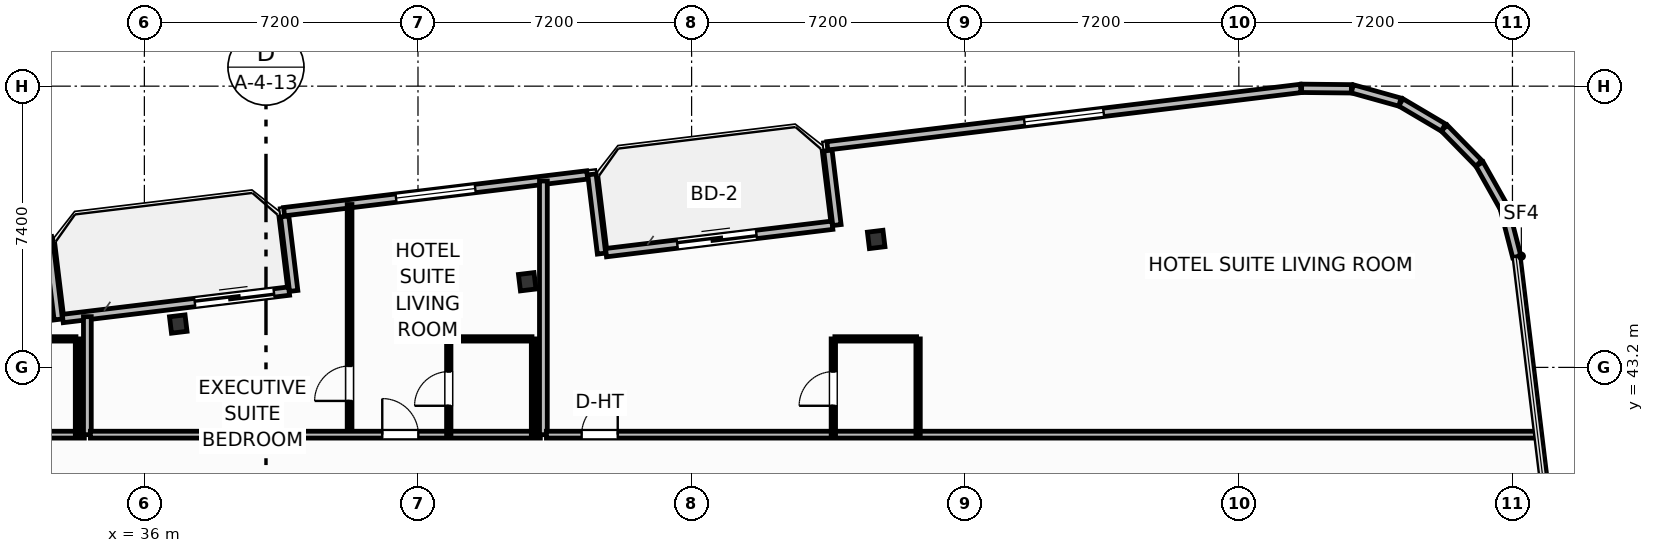
"""IFC4 building model, lengths in metres.
Left out: names, types, materials, properties, quantities, classifications, styles, units other than length and angle.
Written with IfcOpenShell. Run it as: python <this file> out.ifc"""

import sys

from ifc_helpers import new_model, si_unit, direction, frame, frame_2d, origin, origin_2d, place, context, subcontext, project, spatial, rectangle, i_section, extrude, element, fill, save


model = new_model("IFC4")
c1 = context("Model", 3, precision=1e-05, world=origin(), true_north=direction((0.0, 1.0)))
c2 = subcontext(c1, "Body", "Model", "MODEL_VIEW")
j1 = project(units=[si_unit("LENGTHUNIT", "METRE"), si_unit("PLANEANGLEUNIT", "RADIAN")], contexts=[c1])
p1 = place(None, origin())
s1 = spatial("IfcSite", under=j1, at=p1, CompositionType="ELEMENT")
p2 = place(p1, origin())
s2 = spatial("IfcBuilding", under=s1, at=p2, CompositionType="ELEMENT")
p3 = place(p2, frame((0.0, 0.0, 167.2)))
s3 = spatial("IfcBuildingStorey", under=s2, at=p3, CompositionType="ELEMENT", Elevation=167.2)
for number, where, z_axis, x_axis in (
    (1, (55.257, 46.567, 0.0), (0.0, 0.0, 1.0), (0.993, 0.12, 0.0)),
    (2, (46.075, 45.454, 0.0), (0.0, 0.0, 1.0), (0.993, 0.12, 0.0)),
    (3, (36.892, 44.341, 0.0), (0.0, 0.0, 1.0), (0.993, 0.12, 0.0)),
):
    element("IfcColumn", number, at=place(p3, frame(where, z_axis=z_axis, x_axis=x_axis)), inside=s3, PredefinedType="COLUMN", context=c2, shape_type="SweptSolid", body=[
        extrude(i_section(OverallWidth=0.412, OverallDepth=0.435, WebThickness=0.036, FlangeThickness=0.057, FilletRadius=0.025, at=origin_2d()), origin(), (0.0, 0.0, 1.0), 3.7),
    ])
p4 = place(p3, frame((33.852, 44.486, 0.0), z_axis=(0.0, 0.0, 1.0), x_axis=(0.992729951822, 0.120362962556, 0.0)))
e4 = element("IfcWall", 4, at=p4, inside=s3, PredefinedType="SOLIDWALL", context=c2, shape_type="SweptSolid", body=[
    extrude(rectangle(XDim=6.0, YDim=0.22, at=frame_2d((3.0, 0.0))), origin(), (0.0, 0.0, 1.0), 2.73),
])
p5 = place(p4, frame((3.5, 0.0, 0.0)))
e5 = element("IfcOpeningElement", 5, at=p5, cuts=e4, PredefinedType="OPENING", context=c2, shape_type="SweptSolid", body=[
    extrude(rectangle(XDim=2.1, YDim=2.3, at=frame_2d((1.05, 1.15))), frame((0.0, 0.12, 0.0), z_axis=(0.0, -1.0, 0.0), x_axis=(1.0, 0.0, 0.0)), (0.0, 0.0, 1.0), 0.24),
])
p6 = place(p3, frame((48.148, 46.219, 0.0), z_axis=(0.0, 0.0, 1.0), x_axis=(0.992729951822, 0.120362962556, 0.0)))
e6 = element("IfcWall", 6, at=p6, inside=s3, PredefinedType="SOLIDWALL", context=c2, shape_type="SweptSolid", body=[
    extrude(rectangle(XDim=6.0, YDim=0.22, at=frame_2d((3.0, 0.0))), origin(), (0.0, 0.0, 1.0), 2.73),
])
p7 = place(p6, frame((1.888, 0.0, 0.0)))
e7 = element("IfcOpeningElement", 7, at=p7, cuts=e6, PredefinedType="OPENING", context=c2, shape_type="SweptSolid", body=[
    extrude(rectangle(XDim=2.1, YDim=2.3, at=frame_2d((1.05, 1.15))), frame((0.0, 0.12, 0.0), z_axis=(0.0, -1.0, 0.0), x_axis=(1.0, 0.0, 0.0)), (0.0, 0.0, 1.0), 0.24),
])
p8 = place(p3, frame((72.114, 46.112, 0.0), z_axis=(0.0, 0.0, 1.0), x_axis=(-0.248942347653, 0.968518305219, 0.0)))
e8 = element("IfcWall", 8, at=p8, inside=s3, PredefinedType="SOLIDWALL", context=c2, shape_type="SweptSolid", body=[
    extrude(rectangle(XDim=1.326, YDim=0.22, at=frame_2d((0.663, 0.0))), origin(), (0.0, 0.0, 1.0), 2.73),
])
p9 = place(p3, frame((71.771, 47.418, 0.0), z_axis=(0.0, 0.0, 1.0), x_axis=(-0.491098509465, 0.871104043155, 0.0)))
e9 = element("IfcWall", 9, at=p9, inside=s3, PredefinedType="SOLIDWALL", context=c2, shape_type="SweptSolid", body=[
    extrude(rectangle(XDim=1.301, YDim=0.22, at=frame_2d((0.65, 0.0))), origin(), (0.0, 0.0, 1.0), 2.73),
])
p10 = place(p3, frame((71.115, 48.569, 0.0), z_axis=(0.0, 0.0, 1.0), x_axis=(-0.699844331926, 0.714295394827, 0.0)))
e10 = element("IfcWall", 10, at=p10, inside=s3, PredefinedType="SOLIDWALL", context=c2, shape_type="SweptSolid", body=[
    extrude(rectangle(XDim=1.301, YDim=0.22, at=frame_2d((0.65, 0.0))), origin(), (0.0, 0.0, 1.0), 2.73),
])
p11 = place(p3, frame((70.183, 49.511, 0.0), z_axis=(0.0, 0.0, 1.0), x_axis=(-0.860933999601, 0.508716668029, 0.0)))
e11 = element("IfcWall", 11, at=p11, inside=s3, PredefinedType="SOLIDWALL", context=c2, shape_type="SweptSolid", body=[
    extrude(rectangle(XDim=1.301, YDim=0.22, at=frame_2d((0.65, 0.0))), origin(), (0.0, 0.0, 1.0), 2.73),
])
p12 = place(p3, frame((69.039, 50.18, 0.0), z_axis=(0.0, 0.0, 1.0), x_axis=(-0.963205341366, 0.26876657226, 0.0)))
e12 = element("IfcWall", 12, at=p12, inside=s3, PredefinedType="SOLIDWALL", context=c2, shape_type="SweptSolid", body=[
    extrude(rectangle(XDim=1.301, YDim=0.22, at=frame_2d((0.65, 0.0))), origin(), (0.0, 0.0, 1.0), 2.73),
])
p13 = place(p3, frame((67.761, 50.53, 0.0), z_axis=(0.0, 0.0, 1.0), x_axis=(-0.999947358106, 0.010260653861, 0.0)))
e13 = element("IfcWall", 13, at=p13, inside=s3, PredefinedType="SOLIDWALL", context=c2, shape_type="SweptSolid", body=[
    extrude(rectangle(XDim=1.309, YDim=0.22, at=frame_2d((0.654, 0.0))), origin(), (0.0, 0.0, 1.0), 2.73),
])
p14 = place(p3, frame((66.427, 50.54, 0.0), z_axis=(0.0, 0.0, 1.0), x_axis=(-0.992731739233, -0.120348219431, 0.0)))
e14 = element("IfcWall", 14, at=p14, inside=s3, PredefinedType="SOLIDWALL", context=c2, shape_type="SweptSolid", body=[
    extrude(rectangle(XDim=12.547, YDim=0.22, at=frame_2d((6.273, 0.0))), origin(), (0.0, 0.0, 1.0), 2.73),
])
p15 = place(p14, frame((5.224, 0.0, 0.8)))
e15 = element("IfcOpeningElement", 15, at=p15, cuts=e14, PredefinedType="OPENING", context=c2, shape_type="SweptSolid", body=[
    extrude(rectangle(XDim=2.1, YDim=1.75, at=frame_2d((1.05, 0.875))), frame((0.0, 0.12, 0.0), z_axis=(0.0, -1.0, 0.0), x_axis=(1.0, 0.0, 0.0)), (0.0, 0.0, 1.0), 0.24),
])
p16 = place(p3, frame((53.987, 48.906, 0.0), z_axis=(0.0, 0.0, 1.0), x_axis=(0.120397815541, -0.992725725472, 0.0)))
e16 = element("IfcWall", 16, at=p16, inside=s3, PredefinedType="SOLIDWALL", context=c2, shape_type="SweptSolid", body=[
    extrude(rectangle(XDim=1.975, YDim=0.22, at=frame_2d((0.988, 0.0))), origin(), (0.0, 0.0, 1.0), 2.73),
])
p17 = place(p3, frame((48.03, 46.194, 0.0), z_axis=(0.0, 0.0, 1.0), x_axis=(-0.120314009587, 0.992735885871, 0.0)))
e17 = element("IfcWall", 17, at=p17, inside=s3, PredefinedType="SOLIDWALL", context=c2, shape_type="SweptSolid", body=[
    extrude(rectangle(XDim=2.1, YDim=0.22, at=frame_2d((1.05, 0.0))), origin(), (0.0, 0.0, 1.0), 2.73),
])
p18 = place(p3, frame((47.653, 48.264, 0.0), z_axis=(0.0, 0.0, 1.0), x_axis=(-0.992731032022, -0.120354052946, 0.0)))
e18 = element("IfcWall", 18, at=p18, inside=s3, PredefinedType="SOLIDWALL", context=c2, shape_type="SweptSolid", body=[
    extrude(rectangle(XDim=8.035, YDim=0.22, at=frame_2d((4.018, 0.0))), origin(), (0.0, 0.0, 1.0), 2.73),
])
p19 = place(p18, frame((2.968, 0.0, 0.8)))
e19 = element("IfcOpeningElement", 19, at=p19, cuts=e18, PredefinedType="OPENING", context=c2, shape_type="SweptSolid", body=[
    extrude(rectangle(XDim=2.1, YDim=1.75, at=frame_2d((1.05, 0.875))), frame((0.0, 0.12, 0.0), z_axis=(0.0, -1.0, 0.0), x_axis=(1.0, 0.0, 0.0)), (0.0, 0.0, 1.0), 0.24),
])
p20 = place(p3, frame((39.691, 47.173, 0.0), z_axis=(0.0, 0.0, 1.0), x_axis=(0.120397815541, -0.992725725472, 0.0)))
e20 = element("IfcWall", 20, at=p20, inside=s3, PredefinedType="SOLIDWALL", context=c2, shape_type="SweptSolid", body=[
    extrude(rectangle(XDim=1.975, YDim=0.22, at=frame_2d((0.988, 0.0))), origin(), (0.0, 0.0, 1.0), 2.73),
])
p21 = place(p3, frame((33.734, 44.461, 0.0), z_axis=(0.0, 0.0, 1.0), x_axis=(-0.120327895535, 0.992734202874, 0.0)))
e21 = element("IfcWall", 21, at=p21, inside=s3, PredefinedType="SOLIDWALL", context=c2, shape_type="SweptSolid", body=[
    extrude(rectangle(XDim=2.1, YDim=0.22, at=frame_2d((1.05, 0.0))), origin(), (0.0, 0.0, 1.0), 2.73),
])
p22 = place(p3, frame((3.393, 41.43, 0.0), z_axis=(0.0, 0.0, 1.0), x_axis=(1.0, 0.0, 0.0)))
e22 = element("IfcWall", 22, at=p22, inside=s3, PredefinedType="PARTITIONING", context=c2, shape_type="SweptSolid", body=[
    extrude(rectangle(XDim=31.027, YDim=0.18, at=frame_2d((15.513, 0.0))), origin(), (0.0, 0.0, 1.0), 2.662),
])
p23 = place(p22, frame((21.621, 0.0, 0.0)))
e23 = element("IfcOpeningElement", 23, at=p23, cuts=e22, PredefinedType="OPENING", context=c2, shape_type="SweptSolid", body=[
    extrude(rectangle(XDim=0.95, YDim=2.15, at=frame_2d((0.475, 1.075))), frame((0.0, 0.1, 0.0), z_axis=(0.0, -1.0, 0.0), x_axis=(1.0, 0.0, 0.0)), (0.0, 0.0, 1.0), 0.2),
])
p24 = place(p3, frame((32.05, 43.95, 0.0), z_axis=(0.0, 0.0, 1.0), x_axis=(1.0, 0.0, 0.0)))
e24 = element("IfcWall", 24, at=p24, inside=s3, PredefinedType="PARTITIONING", context=c2, shape_type="SweptSolid", body=[
    extrude(rectangle(XDim=2.15, YDim=0.115, at=frame_2d((1.075, 0.0))), origin(), (0.0, 0.0, 1.0), 2.824),
])
p25 = place(p3, frame((34.24, 41.43, 0.0), z_axis=(0.0, 0.0, 1.0), x_axis=(0.0, 1.0, 0.0)))
e25 = element("IfcWall", 25, at=p25, inside=s3, PredefinedType="PARTITIONING", context=c2, shape_type="SweptSolid", body=[
    extrude(rectangle(XDim=2.52, YDim=0.115, at=frame_2d((1.26, 0.0))), origin(), (0.0, 0.0, 1.0), 3.45),
])
p26 = place(p3, frame((34.5, 41.43, 0.0), z_axis=(0.0, 0.0, 1.0), x_axis=(0.0, 1.0, 0.0)))
e26 = element("IfcWall", 26, at=p26, inside=s3, PredefinedType="PARTITIONING", context=c2, shape_type="SweptSolid", body=[
    extrude(rectangle(XDim=3.104, YDim=0.205, at=frame_2d((1.552, 0.0))), origin(), (0.0, 0.0, 1.0), 3.45),
])
p27 = place(p3, frame((41.4, 41.43, 0.0), z_axis=(0.0, 0.0, 1.0), x_axis=(0.0, 1.0, 0.0)))
e27 = element("IfcWall", 27, at=p27, inside=s3, PredefinedType="PARTITIONING", context=c2, shape_type="SweptSolid", body=[
    extrude(rectangle(XDim=6.056, YDim=0.125, at=frame_2d((3.028, 0.0))), origin(), (0.0, 0.0, 1.0), 3.45),
])
p28 = place(p27, frame((0.888, 0.0, 0.0)))
e28 = element("IfcOpeningElement", 28, at=p28, cuts=e27, PredefinedType="OPENING", context=c2, shape_type="SweptSolid", body=[
    extrude(rectangle(XDim=0.92, YDim=2.05, at=frame_2d((0.46, 1.025))), frame((0.0, 0.073, 0.0), z_axis=(0.0, -1.0, 0.0), x_axis=(1.0, 0.0, 0.0)), (0.0, 0.0, 1.0), 0.145),
])
p29 = place(p3, frame((34.58, 41.43, 0.0), z_axis=(0.0, 0.0, 1.0), x_axis=(1.0, 0.0, 0.0)))
e29 = element("IfcWall", 29, at=p29, inside=s3, PredefinedType="PARTITIONING", context=c2, shape_type="SweptSolid", body=[
    extrude(rectangle(XDim=11.84, YDim=0.18, at=frame_2d((5.92, 0.0))), origin(), (0.0, 0.0, 1.0), 3.45),
])
p30 = place(p29, frame((7.68, 0.0, 0.0)))
e30 = element("IfcOpeningElement", 30, at=p30, cuts=e29, PredefinedType="OPENING", context=c2, shape_type="SweptSolid", body=[
    extrude(rectangle(XDim=0.95, YDim=2.15, at=frame_2d((0.475, 1.075))), frame((0.0, 0.1, 0.0), z_axis=(0.0, -1.0, 0.0), x_axis=(1.0, 0.0, 0.0)), (0.0, 0.0, 1.0), 0.2),
])
p31 = place(p3, frame((44.05, 43.95, 0.0), z_axis=(0.0, 0.0, 1.0), x_axis=(1.0, 0.0, 0.0)))
e31 = element("IfcWall", 31, at=p31, inside=s3, PredefinedType="PARTITIONING", context=c2, shape_type="SweptSolid", body=[
    extrude(rectangle(XDim=2.15, YDim=0.115, at=frame_2d((1.075, 0.0))), origin(), (0.0, 0.0, 1.0), 3.45),
])
p32 = place(p3, frame((44.01, 41.43, 0.0), z_axis=(0.0, 0.0, 1.0), x_axis=(0.0, 1.0, 0.0)))
e32 = element("IfcWall", 32, at=p32, inside=s3, PredefinedType="PARTITIONING", context=c2, shape_type="SweptSolid", body=[
    extrude(rectangle(XDim=2.52, YDim=0.115, at=frame_2d((1.26, 0.0))), origin(), (0.0, 0.0, 1.0), 3.45),
])
p33 = place(p32, frame((0.76, 0.0, 0.0)))
e33 = element("IfcOpeningElement", 33, at=p33, cuts=e32, PredefinedType="OPENING", context=c2, shape_type="SweptSolid", body=[
    extrude(rectangle(XDim=0.9, YDim=2.05, at=frame_2d((0.45, 1.025))), frame((0.0, 0.067, 0.0), z_axis=(0.0, -1.0, 0.0), x_axis=(1.0, 0.0, 0.0)), (0.0, 0.0, 1.0), 0.135),
])
p34 = place(p3, frame((46.24, 41.43, 0.0), z_axis=(0.0, 0.0, 1.0), x_axis=(0.0, 1.0, 0.0)))
e34 = element("IfcWall", 34, at=p34, inside=s3, PredefinedType="PARTITIONING", context=c2, shape_type="SweptSolid", body=[
    extrude(rectangle(XDim=2.52, YDim=0.115, at=frame_2d((1.26, 0.0))), origin(), (0.0, 0.0, 1.0), 3.45),
])
p35 = place(p3, frame((46.5, 41.43, 0.0), z_axis=(0.0, 0.0, 1.0), x_axis=(0.0, 1.0, 0.0)))
e35 = element("IfcWall", 35, at=p35, inside=s3, PredefinedType="PARTITIONING", context=c2, shape_type="SweptSolid", body=[
    extrude(rectangle(XDim=6.674, YDim=0.205, at=frame_2d((3.337, 0.0))), origin(), (0.0, 0.0, 1.0), 2.662),
])
p36 = place(p3, frame((46.58, 41.43, 0.0), z_axis=(0.0, 0.0, 1.0), x_axis=(1.0, 0.0, 0.0)))
e36 = element("IfcWall", 36, at=p36, inside=s3, PredefinedType="PARTITIONING", context=c2, shape_type="SweptSolid", body=[
    extrude(rectangle(XDim=26.042, YDim=0.18, at=frame_2d((13.021, 0.0))), origin(), (0.0, 0.0, 1.0), 3.45),
])
p37 = place(p36, frame((0.926, 0.0, 0.0)))
e37 = element("IfcOpeningElement", 37, at=p37, cuts=e36, PredefinedType="OPENING", context=c2, shape_type="SweptSolid", body=[
    extrude(rectangle(XDim=0.95, YDim=2.15, at=frame_2d((0.475, 1.075))), frame((0.0, 0.1, 0.0), z_axis=(0.0, -1.0, 0.0), x_axis=(1.0, 0.0, 0.0)), (0.0, 0.0, 1.0), 0.2),
])
p38 = place(p3, frame((54.17, 43.95, 0.0), z_axis=(0.0, 0.0, 1.0), x_axis=(1.0, 0.0, 0.0)))
e38 = element("IfcWall", 38, at=p38, inside=s3, PredefinedType="PARTITIONING", context=c2, shape_type="SweptSolid", body=[
    extrude(rectangle(XDim=2.15, YDim=0.115, at=frame_2d((1.075, 0.0))), origin(), (0.0, 0.0, 1.0), 3.45),
])
p39 = place(p3, frame((54.13, 41.43, 0.0), z_axis=(0.0, 0.0, 1.0), x_axis=(0.0, 1.0, 0.0)))
e39 = element("IfcWall", 39, at=p39, inside=s3, PredefinedType="PARTITIONING", context=c2, shape_type="SweptSolid", body=[
    extrude(rectangle(XDim=2.52, YDim=0.115, at=frame_2d((1.26, 0.0))), origin(), (0.0, 0.0, 1.0), 3.45),
])
p40 = place(p39, frame((0.76, 0.0, 0.0)))
e40 = element("IfcOpeningElement", 40, at=p40, cuts=e39, PredefinedType="OPENING", context=c2, shape_type="SweptSolid", body=[
    extrude(rectangle(XDim=0.9, YDim=2.05, at=frame_2d((0.45, 1.025))), frame((0.0, 0.067, 0.0), z_axis=(0.0, -1.0, 0.0), x_axis=(1.0, 0.0, 0.0)), (0.0, 0.0, 1.0), 0.135),
])
p41 = place(p3, frame((56.36, 41.43, 0.0), z_axis=(0.0, 0.0, 1.0), x_axis=(0.0, 1.0, 0.0)))
e41 = element("IfcWall", 41, at=p41, inside=s3, PredefinedType="PARTITIONING", context=c2, shape_type="SweptSolid", body=[
    extrude(rectangle(XDim=2.52, YDim=0.115, at=frame_2d((1.26, 0.0))), origin(), (0.0, 0.0, 1.0), 3.45),
])
p42 = place(p5, origin())
e42 = element("IfcDoor", 42, at=p42, inside=s3, OperationType="SLIDING_TO_LEFT", PredefinedType="DOOR", context=c2, shape_type="SweptSolid", body=[
    extrude(rectangle(XDim=2.1, YDim=2.3, at=frame_2d((1.05, 1.15))), frame((0.0, 0.025, 0.0), z_axis=(0.0, -1.0, 0.0), x_axis=(1.0, 0.0, 0.0)), (0.0, 0.0, 1.0), 0.05),
])
fill(e5, e42)
p43 = place(p7, origin())
e43 = element("IfcDoor", 43, at=p43, inside=s3, OperationType="SLIDING_TO_LEFT", PredefinedType="DOOR", context=c2, shape_type="SweptSolid", body=[
    extrude(rectangle(XDim=2.1, YDim=2.3, at=frame_2d((1.05, 1.15))), frame((0.0, 0.025, 0.0), z_axis=(0.0, -1.0, 0.0), x_axis=(1.0, 0.0, 0.0)), (0.0, 0.0, 1.0), 0.05),
])
fill(e7, e43)
p44 = place(p15, origin())
e44 = element("IfcWindow", 44, at=p44, inside=s3, PartitioningType="SINGLE_PANEL", PredefinedType="WINDOW", context=c2, shape_type="SweptSolid", body=[
    extrude(rectangle(XDim=2.1, YDim=1.75, at=frame_2d((1.05, 0.875))), frame((0.0, 0.03, 0.0), z_axis=(0.0, -1.0, 0.0), x_axis=(1.0, 0.0, 0.0)), (0.0, 0.0, 1.0), 0.06),
])
fill(e15, e44)
p45 = place(p19, origin())
e45 = element("IfcWindow", 45, at=p45, inside=s3, PartitioningType="SINGLE_PANEL", PredefinedType="WINDOW", context=c2, shape_type="SweptSolid", body=[
    extrude(rectangle(XDim=2.1, YDim=1.75, at=frame_2d((1.05, 0.875))), frame((0.0, 0.03, 0.0), z_axis=(0.0, -1.0, 0.0), x_axis=(1.0, 0.0, 0.0)), (0.0, 0.0, 1.0), 0.06),
])
fill(e19, e45)
p46 = place(p28, origin())
e46 = element("IfcDoor", 46, at=p46, inside=s3, OperationType="SINGLE_SWING_LEFT", PredefinedType="DOOR", context=c2, shape_type="SweptSolid", body=[
    extrude(rectangle(XDim=0.92, YDim=2.05, at=frame_2d((0.46, 1.025))), frame((0.0, 0.025, 0.0), z_axis=(0.0, -1.0, 0.0), x_axis=(1.0, 0.0, 0.0)), (0.0, 0.0, 1.0), 0.05),
])
fill(e28, e46)
p47 = place(p30, origin())
e47 = element("IfcDoor", 47, at=p47, inside=s3, OperationType="SINGLE_SWING_LEFT", PredefinedType="DOOR", context=c2, shape_type="SweptSolid", body=[
    extrude(rectangle(XDim=0.95, YDim=2.15, at=frame_2d((0.475, 1.075))), frame((0.0, 0.025, 0.0), z_axis=(0.0, -1.0, 0.0), x_axis=(1.0, 0.0, 0.0)), (0.0, 0.0, 1.0), 0.05),
])
fill(e30, e47)
p48 = place(p33, origin())
e48 = element("IfcDoor", 48, at=p48, inside=s3, OperationType="SINGLE_SWING_LEFT", PredefinedType="DOOR", context=c2, shape_type="SweptSolid", body=[
    extrude(rectangle(XDim=0.9, YDim=2.05, at=frame_2d((0.45, 1.025))), frame((0.0, 0.025, 0.0), z_axis=(0.0, -1.0, 0.0), x_axis=(1.0, 0.0, 0.0)), (0.0, 0.0, 1.0), 0.05),
])
fill(e33, e48)
p49 = place(p37, origin())
e49 = element("IfcDoor", 49, at=p49, inside=s3, OperationType="SINGLE_SWING_RIGHT", PredefinedType="DOOR", context=c2, shape_type="SweptSolid", body=[
    extrude(rectangle(XDim=0.95, YDim=2.15, at=frame_2d((0.475, 1.075))), frame((0.0, 0.025, 0.0), z_axis=(0.0, -1.0, 0.0), x_axis=(1.0, 0.0, 0.0)), (0.0, 0.0, 1.0), 0.05),
])
fill(e37, e49)
p50 = place(p40, origin())
e50 = element("IfcDoor", 50, at=p50, inside=s3, OperationType="SINGLE_SWING_LEFT", PredefinedType="DOOR", context=c2, shape_type="SweptSolid", body=[
    extrude(rectangle(XDim=0.9, YDim=2.05, at=frame_2d((0.45, 1.025))), frame((0.0, 0.025, 0.0), z_axis=(0.0, -1.0, 0.0), x_axis=(1.0, 0.0, 0.0)), (0.0, 0.0, 1.0), 0.05),
])
fill(e40, e50)
save(model, sys.argv[1])
